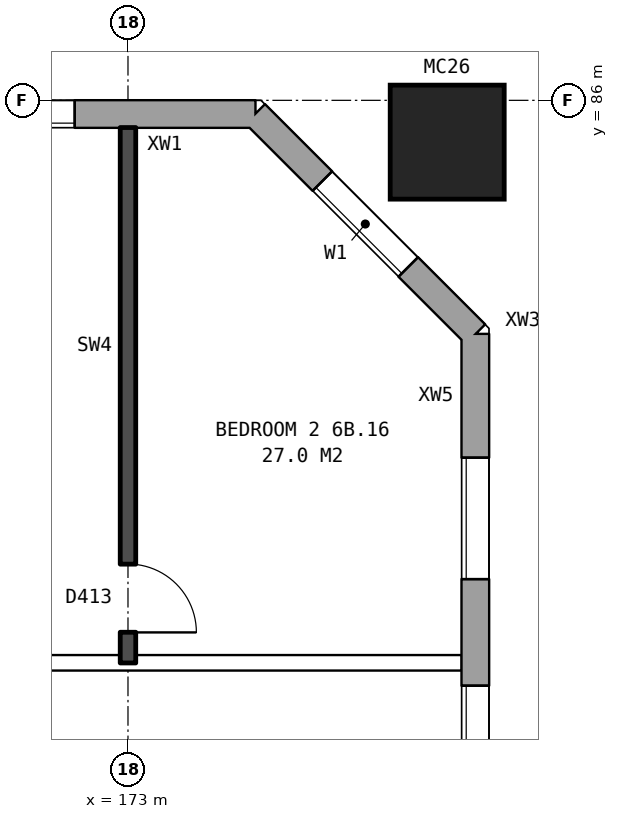
"""IFC4 building model, lengths in metres.
Left out: names, types, materials, properties, quantities, classifications, styles, units other than length and angle.
Written with IfcOpenShell. Run it as: python <this file> out.ifc"""

import sys

from ifc_helpers import new_model, si_unit, direction, frame, frame_2d, origin, origin_2d, place, context, subcontext, project, spatial, rectangle, hollow_rectangle, extrude, element, fill, save


model = new_model("IFC4")
c1 = context("Model", 3, precision=1e-05, world=origin(), true_north=direction((0.0, 1.0)))
c2 = subcontext(c1, "Body", "Model", "MODEL_VIEW")
j1 = project(units=[si_unit("LENGTHUNIT", "METRE"), si_unit("PLANEANGLEUNIT", "RADIAN")], contexts=[c1])
p1 = place(None, origin())
s1 = spatial("IfcSite", under=j1, at=p1, CompositionType="ELEMENT")
p2 = place(p1, origin())
s2 = spatial("IfcBuilding", under=s1, at=p2, CompositionType="ELEMENT")
p3 = place(p2, frame((0.0, 0.0, 25.7)))
s3 = spatial("IfcBuildingStorey", under=s2, at=p3, CompositionType="ELEMENT", Elevation=25.7)
p4 = place(p3, frame((177.2, 85.45, 0.0), z_axis=(0.0, 0.0, 1.0), x_axis=(1.0, 0.0, 0.0)))
e1 = element("IfcColumn", 1, at=p4, inside=s3, PredefinedType="COLUMN", context=c2, shape_type="SweptSolid", body=[
    extrude(hollow_rectangle(XDim=1.5, YDim=1.5, WallThickness=0.08, at=origin_2d()), origin(), (0.0, 0.0, 1.0), 3.1),
])
p5 = place(p3, frame((177.57, 57.075, 0.0), z_axis=(0.0, 0.0, 1.0), x_axis=(0.0, 1.0, 0.0)))
e2 = element("IfcWall", 2, at=p5, inside=s3, PredefinedType="STANDARD", context=c2, shape_type="SweptSolid", body=[
    extrude(rectangle(XDim=25.851, YDim=0.36, at=frame_2d((12.925, 0.0))), origin(), (0.0, 0.0, 1.0), 2.85),
])
p6 = place(p5, frame((1.625, 0.0, 0.8)))
e3 = element("IfcOpeningElement", 3, at=p6, cuts=e2, PredefinedType="OPENING", context=c2, shape_type="SweptSolid", body=[
    extrude(rectangle(XDim=1.6, YDim=1.8, at=frame_2d((0.8, 0.9))), frame((0.0, 0.19, 0.0), z_axis=(0.0, -1.0, 0.0), x_axis=(1.0, 0.0, 0.0)), (0.0, 0.0, 1.0), 0.38),
])
p7 = place(p5, frame((4.625, 0.0, 0.8)))
e4 = element("IfcOpeningElement", 4, at=p7, cuts=e2, PredefinedType="OPENING", context=c2, shape_type="SweptSolid", body=[
    extrude(rectangle(XDim=1.6, YDim=1.8, at=frame_2d((0.8, 0.9))), frame((0.0, 0.19, 0.0), z_axis=(0.0, -1.0, 0.0), x_axis=(1.0, 0.0, 0.0)), (0.0, 0.0, 1.0), 0.38),
])
p8 = place(p5, frame((6.525, 0.0, 0.8)))
e5 = element("IfcOpeningElement", 5, at=p8, cuts=e2, PredefinedType="OPENING", context=c2, shape_type="SweptSolid", body=[
    extrude(rectangle(XDim=1.6, YDim=1.8, at=frame_2d((0.8, 0.9))), frame((0.0, 0.19, 0.0), z_axis=(0.0, -1.0, 0.0), x_axis=(1.0, 0.0, 0.0)), (0.0, 0.0, 1.0), 0.38),
])
p9 = place(p5, frame((8.425, 0.0, 1.1)))
e6 = element("IfcOpeningElement", 6, at=p9, cuts=e2, PredefinedType="OPENING", context=c2, shape_type="SweptSolid", body=[
    extrude(rectangle(XDim=0.8, YDim=1.5, at=frame_2d((0.4, 0.75))), frame((0.0, 0.19, 0.0), z_axis=(0.0, -1.0, 0.0), x_axis=(1.0, 0.0, 0.0)), (0.0, 0.0, 1.0), 0.38),
])
p10 = place(p5, frame((9.525, 0.0, 1.6)))
e7 = element("IfcOpeningElement", 7, at=p10, cuts=e2, PredefinedType="OPENING", context=c2, shape_type="SweptSolid", body=[
    extrude(rectangle(XDim=0.6, YDim=0.9, at=frame_2d((0.3, 0.45))), frame((0.0, 0.19, 0.0), z_axis=(0.0, -1.0, 0.0), x_axis=(1.0, 0.0, 0.0)), (0.0, 0.0, 1.0), 0.38),
])
p11 = place(p5, frame((11.525, 0.0, 0.8)))
e8 = element("IfcOpeningElement", 8, at=p11, cuts=e2, PredefinedType="OPENING", context=c2, shape_type="SweptSolid", body=[
    extrude(rectangle(XDim=0.6, YDim=0.9, at=frame_2d((0.3, 0.45))), frame((0.0, 0.19, 0.0), z_axis=(0.0, -1.0, 0.0), x_axis=(1.0, 0.0, 0.0)), (0.0, 0.0, 1.0), 0.38),
])
p12 = place(p5, frame((19.625, 0.0, 0.8)))
e9 = element("IfcOpeningElement", 9, at=p12, cuts=e2, PredefinedType="OPENING", context=c2, shape_type="SweptSolid", body=[
    extrude(rectangle(XDim=1.6, YDim=1.8, at=frame_2d((0.8, 0.9))), frame((0.0, 0.19, 0.0), z_axis=(0.0, -1.0, 0.0), x_axis=(1.0, 0.0, 0.0)), (0.0, 0.0, 1.0), 0.38),
])
p13 = place(p5, frame((22.625, 0.0, 0.8)))
e10 = element("IfcOpeningElement", 10, at=p13, cuts=e2, PredefinedType="OPENING", context=c2, shape_type="SweptSolid", body=[
    extrude(rectangle(XDim=1.6, YDim=1.8, at=frame_2d((0.8, 0.9))), frame((0.0, 0.19, 0.0), z_axis=(0.0, -1.0, 0.0), x_axis=(1.0, 0.0, 0.0)), (0.0, 0.0, 1.0), 0.38),
])
p14 = place(p5, frame((12.425, 0.0, 0.8)))
e11 = element("IfcOpeningElement", 11, at=p14, cuts=e2, PredefinedType="OPENING", context=c2, shape_type="SweptSolid", body=[
    extrude(rectangle(XDim=1.0, YDim=1.8, at=frame_2d((0.5, 0.9))), frame((0.0, 0.19, 0.0), z_axis=(0.0, -1.0, 0.0), x_axis=(1.0, 0.0, 0.0)), (0.0, 0.0, 1.0), 0.38),
])
p15 = place(p5, frame((13.725, 0.0, 0.8)))
e12 = element("IfcOpeningElement", 12, at=p15, cuts=e2, PredefinedType="OPENING", context=c2, shape_type="SweptSolid", body=[
    extrude(rectangle(XDim=0.6, YDim=0.9, at=frame_2d((0.3, 0.45))), frame((0.0, 0.19, 0.0), z_axis=(0.0, -1.0, 0.0), x_axis=(1.0, 0.0, 0.0)), (0.0, 0.0, 1.0), 0.38),
])
p16 = place(p5, frame((15.575, 0.0, 1.7)))
e13 = element("IfcOpeningElement", 13, at=p16, cuts=e2, PredefinedType="OPENING", context=c2, shape_type="SweptSolid", body=[
    extrude(rectangle(XDim=0.6, YDim=0.9, at=frame_2d((0.3, 0.45))), frame((0.0, 0.19, 0.0), z_axis=(0.0, -1.0, 0.0), x_axis=(1.0, 0.0, 0.0)), (0.0, 0.0, 1.0), 0.38),
])
p17 = place(p5, frame((16.575, 0.0, 1.1)))
e14 = element("IfcOpeningElement", 14, at=p17, cuts=e2, PredefinedType="OPENING", context=c2, shape_type="SweptSolid", body=[
    extrude(rectangle(XDim=0.8, YDim=1.5, at=frame_2d((0.4, 0.75))), frame((0.0, 0.19, 0.0), z_axis=(0.0, -1.0, 0.0), x_axis=(1.0, 0.0, 0.0)), (0.0, 0.0, 1.0), 0.38),
])
p18 = place(p5, frame((17.675, 0.0, 0.8)))
e15 = element("IfcOpeningElement", 15, at=p18, cuts=e2, PredefinedType="OPENING", context=c2, shape_type="SweptSolid", body=[
    extrude(rectangle(XDim=1.6, YDim=1.8, at=frame_2d((0.8, 0.9))), frame((0.0, 0.19, 0.0), z_axis=(0.0, -1.0, 0.0), x_axis=(1.0, 0.0, 0.0)), (0.0, 0.0, 1.0), 0.38),
])
p19 = place(p3, frame((177.57, 82.925, 0.0), z_axis=(0.0, 0.0, 1.0), x_axis=(-0.707106781187, 0.707106781187, 0.0)))
e16 = element("IfcWall", 16, at=p19, inside=s3, PredefinedType="STANDARD", context=c2, shape_type="SweptSolid", body=[
    extrude(rectangle(XDim=4.094, YDim=0.36, at=frame_2d((2.047, 0.0))), origin(), (0.0, 0.0, 1.0), 2.85),
])
p20 = place(p19, frame((1.247, 0.0, 0.8)))
e17 = element("IfcOpeningElement", 17, at=p20, cuts=e16, PredefinedType="OPENING", context=c2, shape_type="SweptSolid", body=[
    extrude(rectangle(XDim=1.6, YDim=1.8, at=frame_2d((0.8, 0.9))), frame((0.0, 0.19, 0.0), z_axis=(0.0, -1.0, 0.0), x_axis=(1.0, 0.0, 0.0)), (0.0, 0.0, 1.0), 0.38),
])
p21 = place(p3, frame((174.675, 85.82, 0.0), z_axis=(0.0, 0.0, 1.0), x_axis=(-1.0, 0.0, 0.0)))
e18 = element("IfcWall", 18, at=p21, inside=s3, PredefinedType="STANDARD", context=c2, shape_type="SweptSolid", body=[
    extrude(rectangle(XDim=40.601, YDim=0.36, at=frame_2d((20.3, 0.0))), origin(), (0.0, 0.0, 1.0), 2.85),
])
p22 = place(p21, frame((2.375, 0.0, 0.8)))
e19 = element("IfcOpeningElement", 19, at=p22, cuts=e18, PredefinedType="OPENING", context=c2, shape_type="SweptSolid", body=[
    extrude(rectangle(XDim=1.6, YDim=1.8, at=frame_2d((0.8, 0.9))), frame((0.0, 0.19, 0.0), z_axis=(0.0, -1.0, 0.0), x_axis=(1.0, 0.0, 0.0)), (0.0, 0.0, 1.0), 0.38),
])
p23 = place(p21, frame((4.275, 0.0, 0.8)))
e20 = element("IfcOpeningElement", 20, at=p23, cuts=e18, PredefinedType="OPENING", context=c2, shape_type="SweptSolid", body=[
    extrude(rectangle(XDim=1.2, YDim=1.8, at=frame_2d((0.6, 0.9))), frame((0.0, 0.19, 0.0), z_axis=(0.0, -1.0, 0.0), x_axis=(1.0, 0.0, 0.0)), (0.0, 0.0, 1.0), 0.38),
])
p24 = place(p21, frame((8.025, 0.0, 0.8)))
e21 = element("IfcOpeningElement", 21, at=p24, cuts=e18, PredefinedType="OPENING", context=c2, shape_type="SweptSolid", body=[
    extrude(rectangle(XDim=0.8, YDim=0.9, at=frame_2d((0.4, 0.45))), frame((0.0, 0.19, 0.0), z_axis=(0.0, -1.0, 0.0), x_axis=(1.0, 0.0, 0.0)), (0.0, 0.0, 1.0), 0.38),
])
p25 = place(p21, frame((11.375, 0.0, 0.8)))
e22 = element("IfcOpeningElement", 22, at=p25, cuts=e18, PredefinedType="OPENING", context=c2, shape_type="SweptSolid", body=[
    extrude(rectangle(XDim=1.6, YDim=1.8, at=frame_2d((0.8, 0.9))), frame((0.0, 0.19, 0.0), z_axis=(0.0, -1.0, 0.0), x_axis=(1.0, 0.0, 0.0)), (0.0, 0.0, 1.0), 0.38),
])
p26 = place(p21, frame((14.375, 0.0, 0.8)))
e23 = element("IfcOpeningElement", 23, at=p26, cuts=e18, PredefinedType="OPENING", context=c2, shape_type="SweptSolid", body=[
    extrude(rectangle(XDim=1.6, YDim=1.8, at=frame_2d((0.8, 0.9))), frame((0.0, 0.19, 0.0), z_axis=(0.0, -1.0, 0.0), x_axis=(1.0, 0.0, 0.0)), (0.0, 0.0, 1.0), 0.38),
])
p27 = place(p21, frame((17.375, 0.0, 0.8)))
e24 = element("IfcOpeningElement", 24, at=p27, cuts=e18, PredefinedType="OPENING", context=c2, shape_type="SweptSolid", body=[
    extrude(rectangle(XDim=1.6, YDim=1.8, at=frame_2d((0.8, 0.9))), frame((0.0, 0.19, 0.0), z_axis=(0.0, -1.0, 0.0), x_axis=(1.0, 0.0, 0.0)), (0.0, 0.0, 1.0), 0.38),
])
p28 = place(p21, frame((20.375, 0.0, 0.8)))
e25 = element("IfcOpeningElement", 25, at=p28, cuts=e18, PredefinedType="OPENING", context=c2, shape_type="SweptSolid", body=[
    extrude(rectangle(XDim=1.6, YDim=1.8, at=frame_2d((0.8, 0.9))), frame((0.0, 0.19, 0.0), z_axis=(0.0, -1.0, 0.0), x_axis=(1.0, 0.0, 0.0)), (0.0, 0.0, 1.0), 0.38),
])
p29 = place(p21, frame((23.375, 0.0, 0.8)))
e26 = element("IfcOpeningElement", 26, at=p29, cuts=e18, PredefinedType="OPENING", context=c2, shape_type="SweptSolid", body=[
    extrude(rectangle(XDim=1.6, YDim=1.8, at=frame_2d((0.8, 0.9))), frame((0.0, 0.19, 0.0), z_axis=(0.0, -1.0, 0.0), x_axis=(1.0, 0.0, 0.0)), (0.0, 0.0, 1.0), 0.38),
])
p30 = place(p21, frame((26.375, 0.0, 0.8)))
e27 = element("IfcOpeningElement", 27, at=p30, cuts=e18, PredefinedType="OPENING", context=c2, shape_type="SweptSolid", body=[
    extrude(rectangle(XDim=1.6, YDim=1.8, at=frame_2d((0.8, 0.9))), frame((0.0, 0.19, 0.0), z_axis=(0.0, -1.0, 0.0), x_axis=(1.0, 0.0, 0.0)), (0.0, 0.0, 1.0), 0.38),
])
p31 = place(p21, frame((29.375, 0.0, 0.8)))
e28 = element("IfcOpeningElement", 28, at=p31, cuts=e18, PredefinedType="OPENING", context=c2, shape_type="SweptSolid", body=[
    extrude(rectangle(XDim=1.6, YDim=1.8, at=frame_2d((0.8, 0.9))), frame((0.0, 0.19, 0.0), z_axis=(0.0, -1.0, 0.0), x_axis=(1.0, 0.0, 0.0)), (0.0, 0.0, 1.0), 0.38),
])
p32 = place(p21, frame((31.875, 0.0, 0.8)))
e29 = element("IfcOpeningElement", 29, at=p32, cuts=e18, PredefinedType="OPENING", context=c2, shape_type="SweptSolid", body=[
    extrude(rectangle(XDim=0.6, YDim=0.9, at=frame_2d((0.3, 0.45))), frame((0.0, 0.19, 0.0), z_axis=(0.0, -1.0, 0.0), x_axis=(1.0, 0.0, 0.0)), (0.0, 0.0, 1.0), 0.38),
])
p33 = place(p21, frame((35.375, 0.0, 0.8)))
e30 = element("IfcOpeningElement", 30, at=p33, cuts=e18, PredefinedType="OPENING", context=c2, shape_type="SweptSolid", body=[
    extrude(rectangle(XDim=1.6, YDim=1.8, at=frame_2d((0.8, 0.9))), frame((0.0, 0.19, 0.0), z_axis=(0.0, -1.0, 0.0), x_axis=(1.0, 0.0, 0.0)), (0.0, 0.0, 1.0), 0.38),
])
p34 = place(p21, frame((38.375, 0.0, 0.8)))
e31 = element("IfcOpeningElement", 31, at=p34, cuts=e18, PredefinedType="OPENING", context=c2, shape_type="SweptSolid", body=[
    extrude(rectangle(XDim=1.6, YDim=1.8, at=frame_2d((0.8, 0.9))), frame((0.0, 0.19, 0.0), z_axis=(0.0, -1.0, 0.0), x_axis=(1.0, 0.0, 0.0)), (0.0, 0.0, 1.0), 0.38),
])
p35 = place(p21, frame((5.775, 0.0, 1.7)))
e32 = element("IfcOpeningElement", 32, at=p35, cuts=e18, PredefinedType="OPENING", context=c2, shape_type="SweptSolid", body=[
    extrude(rectangle(XDim=1.0, YDim=0.9, at=frame_2d((0.5, 0.45))), frame((0.0, 0.19, 0.0), z_axis=(0.0, -1.0, 0.0), x_axis=(1.0, 0.0, 0.0)), (0.0, 0.0, 1.0), 0.38),
])
p36 = place(p21, frame((9.125, 0.0, 0.8)))
e33 = element("IfcOpeningElement", 33, at=p36, cuts=e18, PredefinedType="OPENING", context=c2, shape_type="SweptSolid", body=[
    extrude(rectangle(XDim=1.2, YDim=1.8, at=frame_2d((0.6, 0.9))), frame((0.0, 0.19, 0.0), z_axis=(0.0, -1.0, 0.0), x_axis=(1.0, 0.0, 0.0)), (0.0, 0.0, 1.0), 0.38),
])
p37 = place(p21, frame((33.825, 0.0, 1.7)))
e34 = element("IfcOpeningElement", 34, at=p37, cuts=e18, PredefinedType="OPENING", context=c2, shape_type="SweptSolid", body=[
    extrude(rectangle(XDim=1.2, YDim=0.9, at=frame_2d((0.6, 0.45))), frame((0.0, 0.19, 0.0), z_axis=(0.0, -1.0, 0.0), x_axis=(1.0, 0.0, 0.0)), (0.0, 0.0, 1.0), 0.38),
])
p38 = place(p3, frame((155.1, 78.6, 0.0), z_axis=(0.0, 0.0, 1.0), x_axis=(1.0, 0.0, 0.0)))
e35 = element("IfcWall", 35, at=p38, inside=s3, PredefinedType="PARTITIONING", context=c2, shape_type="SweptSolid", body=[
    extrude(rectangle(XDim=22.29, YDim=0.2, at=frame_2d((11.145, 0.0))), origin(), (0.0, 0.0, 1.0), 2.85),
])
p39 = place(p38, frame((2.45, 0.0, 0.0)))
e36 = element("IfcOpeningElement", 36, at=p39, cuts=e35, PredefinedType="OPENING", context=c2, shape_type="SweptSolid", body=[
    extrude(rectangle(XDim=1.0, YDim=2.1, at=frame_2d((0.5, 1.05))), frame((0.0, 0.11, 0.0), z_axis=(0.0, -1.0, 0.0), x_axis=(1.0, 0.0, 0.0)), (0.0, 0.0, 1.0), 0.22),
])
p40 = place(p38, frame((14.4, 0.0, 0.0)))
e37 = element("IfcOpeningElement", 37, at=p40, cuts=e35, PredefinedType="OPENING", context=c2, shape_type="SweptSolid", body=[
    extrude(rectangle(XDim=1.0, YDim=2.1, at=frame_2d((0.5, 1.05))), frame((0.0, 0.11, 0.0), z_axis=(0.0, -1.0, 0.0), x_axis=(1.0, 0.0, 0.0)), (0.0, 0.0, 1.0), 0.22),
])
p41 = place(p3, frame((173.0, 78.6, 0.0), z_axis=(0.0, 0.0, 1.0), x_axis=(0.0, 1.0, 0.0)))
e38 = element("IfcWall", 38, at=p41, inside=s3, PredefinedType="SOLIDWALL", context=c2, shape_type="SweptSolid", body=[
    extrude(rectangle(XDim=7.04, YDim=0.2, at=frame_2d((3.52, 0.0))), origin(), (0.0, 0.0, 1.0), 2.85),
])
p42 = place(p41, frame((0.4, 0.0, 0.0)))
e39 = element("IfcOpeningElement", 39, at=p42, cuts=e38, PredefinedType="OPENING", context=c2, shape_type="SweptSolid", body=[
    extrude(rectangle(XDim=0.9, YDim=2.1, at=frame_2d((0.45, 1.05))), frame((0.0, 0.11, 0.0), z_axis=(0.0, -1.0, 0.0), x_axis=(1.0, 0.0, 0.0)), (0.0, 0.0, 1.0), 0.22),
])
p43 = place(p12, origin())
e40 = element("IfcWindow", 40, at=p43, inside=s3, PartitioningType="SINGLE_PANEL", PredefinedType="WINDOW", context=c2, shape_type="SweptSolid", body=[
    extrude(rectangle(XDim=1.6, YDim=1.8, at=frame_2d((0.8, 0.9))), frame((0.0, 0.15, 0.0), z_axis=(0.0, -1.0, 0.0), x_axis=(1.0, 0.0, 0.0)), (0.0, 0.0, 1.0), 0.06),
])
fill(e9, e40)
p44 = place(p13, origin())
e41 = element("IfcWindow", 41, at=p44, inside=s3, PartitioningType="SINGLE_PANEL", PredefinedType="WINDOW", context=c2, shape_type="SweptSolid", body=[
    extrude(rectangle(XDim=1.6, YDim=1.8, at=frame_2d((0.8, 0.9))), frame((0.0, 0.15, 0.0), z_axis=(0.0, -1.0, 0.0), x_axis=(1.0, 0.0, 0.0)), (0.0, 0.0, 1.0), 0.06),
])
fill(e10, e41)
p45 = place(p20, origin())
e42 = element("IfcWindow", 42, at=p45, inside=s3, PartitioningType="SINGLE_PANEL", PredefinedType="WINDOW", context=c2, shape_type="SweptSolid", body=[
    extrude(rectangle(XDim=1.6, YDim=1.8, at=frame_2d((0.8, 0.9))), frame((0.0, 0.15, 0.0), z_axis=(0.0, -1.0, 0.0), x_axis=(1.0, 0.0, 0.0)), (0.0, 0.0, 1.0), 0.06),
])
fill(e17, e42)
p46 = place(p22, origin())
e43 = element("IfcWindow", 43, at=p46, inside=s3, PartitioningType="SINGLE_PANEL", PredefinedType="WINDOW", context=c2, shape_type="SweptSolid", body=[
    extrude(rectangle(XDim=1.6, YDim=1.8, at=frame_2d((0.8, 0.9))), frame((0.0, 0.15, 0.0), z_axis=(0.0, -1.0, 0.0), x_axis=(1.0, 0.0, 0.0)), (0.0, 0.0, 1.0), 0.06),
])
fill(e19, e43)
p47 = place(p42, frame((0.9, 0.0, 0.0), z_axis=(0.0, 0.0, 1.0), x_axis=(-1.0, 0.0, 0.0)))
e44 = element("IfcDoor", 44, at=p47, inside=s3, OperationType="SINGLE_SWING_RIGHT", PredefinedType="DOOR", context=c2, shape_type="SweptSolid", body=[
    extrude(rectangle(XDim=0.9, YDim=2.1, at=frame_2d((0.45, 1.05))), frame((0.0, 0.025, 0.0), z_axis=(0.0, -1.0, 0.0), x_axis=(1.0, 0.0, 0.0)), (0.0, 0.0, 1.0), 0.05),
])
fill(e39, e44)
save(model, sys.argv[1])
